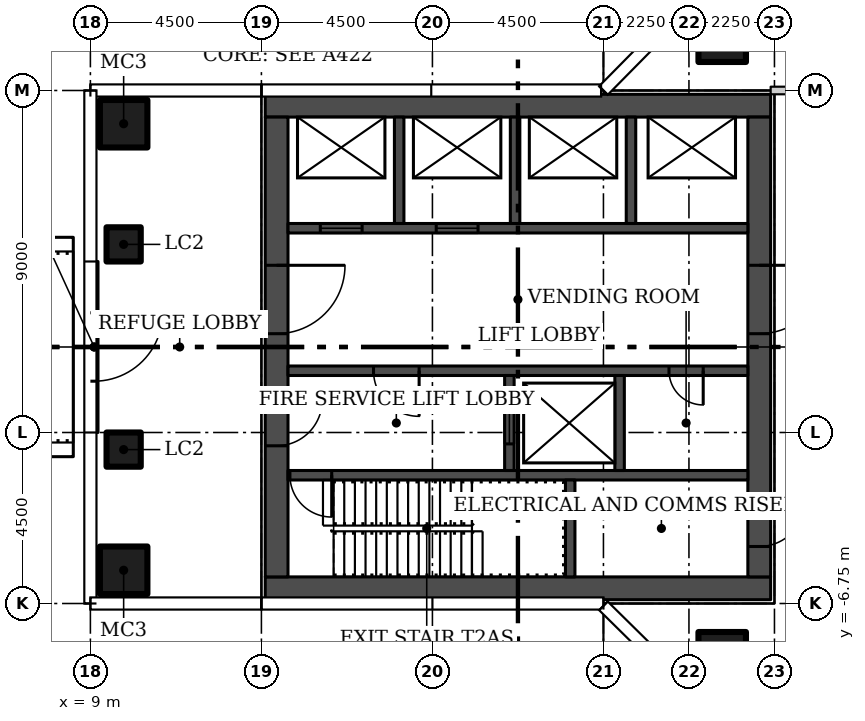
"""IFC4 building model, lengths in metres.
Left out: names, types, materials, properties, quantities, classifications, styles, units other than length and angle.
Written with IfcOpenShell. Run it as: python <this file> out.ifc"""

import sys

from ifc_helpers import new_model, si_unit, direction, frame, frame_2d, origin, origin_2d, place, context, subcontext, project, spatial, rectangle, hollow_rectangle, extrude, element, fill, save


model = new_model("IFC4")
c1 = context("Model", 3, precision=1e-05, world=origin(), true_north=direction((0.0, 1.0)))
c2 = subcontext(c1, "Body", "Model", "MODEL_VIEW")
j1 = project(units=[si_unit("LENGTHUNIT", "METRE"), si_unit("PLANEANGLEUNIT", "RADIAN")], contexts=[c1])
p1 = place(None, origin())
s1 = spatial("IfcSite", under=j1, at=p1, CompositionType="ELEMENT")
p2 = place(p1, origin())
s2 = spatial("IfcBuilding", under=s1, at=p2, CompositionType="ELEMENT")
p3 = place(p2, frame((0.0, 0.0, 128.7)))
s3 = spatial("IfcBuildingStorey", under=s2, at=p3, CompositionType="ELEMENT", Elevation=128.7)
for number, where in (
    (1, (25.625, 8.125, 0.0)),
    (2, (25.625, -8.125, 0.0)),
    (3, (9.875, -5.875, 0.0)),
    (4, (9.875, 5.875, 0.0)),
):
    element("IfcColumn", number, at=place(p3, frame(where)), inside=s3, PredefinedType="COLUMN", context=c2, shape_type="SweptSolid", body=[
        extrude(hollow_rectangle(XDim=1.25, YDim=1.25, WallThickness=0.05, at=origin_2d()), origin(), (0.0, 0.0, 1.0), 4.4),
    ])
for number, where in (
    (5, (9.875, -2.7, 0.0)),
    (6, (9.875, 2.7, 0.0)),
):
    element("IfcColumn", number, at=place(p3, frame(where)), inside=s3, PredefinedType="COLUMN", context=c2, shape_type="SweptSolid", body=[
        extrude(hollow_rectangle(XDim=0.9, YDim=0.9, WallThickness=0.036, at=origin_2d()), origin(), (0.0, 0.0, 1.0), 4.4),
    ])
p4 = place(p3, frame((40.6, 6.75, 0.0), z_axis=(0.0, 0.0, 1.0), x_axis=(-1.0, 0.0, 0.0)))
e7 = element("IfcWall", 7, at=p4, inside=s3, PredefinedType="PARTITIONING", context=c2, shape_type="SweptSolid", body=[
    extrude(rectangle(XDim=13.7, YDim=0.2, at=frame_2d((6.85, 0.0))), origin(), (0.0, 0.0, 1.0), 4.4),
])
p5 = place(p4, frame((6.1, 0.0, 0.0)))
e8 = element("IfcOpeningElement", 8, at=p5, cuts=e7, PredefinedType="OPENING", context=c2, shape_type="SweptSolid", body=[
    extrude(rectangle(XDim=1.5, YDim=2.4, at=frame_2d((0.75, 1.2))), frame((0.0, 0.11, 0.0), z_axis=(0.0, -1.0, 0.0), x_axis=(1.0, 0.0, 0.0)), (0.0, 0.0, 1.0), 0.22),
])
p6 = place(p3, frame((9.1, 2.25, 0.0), z_axis=(0.0, 0.0, 1.0), x_axis=(0.0, -1.0, 0.0)))
e9 = element("IfcWall", 9, at=p6, inside=s3, PredefinedType="PARTITIONING", context=c2, shape_type="SweptSolid", body=[
    extrude(rectangle(XDim=4.5, YDim=0.2, at=frame_2d((2.25, 0.0))), origin(), (0.0, 0.0, 1.0), 4.4),
])
p7 = place(p6, frame((1.35, 0.0, 0.0)))
e10 = element("IfcOpeningElement", 10, at=p7, cuts=e9, PredefinedType="OPENING", context=c2, shape_type="SweptSolid", body=[
    extrude(rectangle(XDim=1.8, YDim=2.1, at=frame_2d((0.9, 1.05))), frame((0.0, 0.11, 0.0), z_axis=(0.0, -1.0, 0.0), x_axis=(1.0, 0.0, 0.0)), (0.0, 0.0, 1.0), 0.22),
])
for number, where in (
    (11, (13.6, -6.35, 0.0)),
    (12, (13.6, 6.35, 0.0)),
):
    element("IfcWall", number, at=place(p3, frame(where)), inside=s3, PredefinedType="SHEAR", context=c2, shape_type="SweptSolid", body=[
        extrude(rectangle(XDim=13.3, YDim=0.6, at=frame_2d((6.65, 0.0))), origin(), (0.0, 0.0, 1.0), 4.4),
    ])
p8 = place(p3, frame((13.9, 6.05, 0.0), z_axis=(0.0, 0.0, 1.0), x_axis=(0.0, -1.0, 0.0)))
e13 = element("IfcWall", 13, at=p8, inside=s3, PredefinedType="SHEAR", context=c2, shape_type="SweptSolid", body=[
    extrude(rectangle(XDim=12.1, YDim=0.6, at=frame_2d((6.05, 0.0))), origin(), (0.0, 0.0, 1.0), 4.4),
])
p9 = place(p8, frame((7.45, 0.0, 0.0)))
e14 = element("IfcOpeningElement", 14, at=p9, cuts=e13, PredefinedType="OPENING", context=c2, shape_type="SweptSolid", body=[
    extrude(rectangle(XDim=1.2, YDim=2.1, at=frame_2d((0.6, 1.05))), frame((0.0, 0.31, 0.0), z_axis=(0.0, -1.0, 0.0), x_axis=(1.0, 0.0, 0.0)), (0.0, 0.0, 1.0), 0.62),
])
p10 = place(p8, frame((3.9, 0.0, 0.0)))
e15 = element("IfcOpeningElement", 15, at=p10, cuts=e13, PredefinedType="OPENING", context=c2, shape_type="SweptSolid", body=[
    extrude(rectangle(XDim=1.8, YDim=2.4, at=frame_2d((0.9, 1.2))), frame((0.0, 0.31, 0.0), z_axis=(0.0, -1.0, 0.0), x_axis=(1.0, 0.0, 0.0)), (0.0, 0.0, 1.0), 0.62),
])
p11 = place(p3, frame((26.6, 6.05, 0.0), z_axis=(0.0, 0.0, 1.0), x_axis=(0.0, -1.0, 0.0)))
e16 = element("IfcWall", 16, at=p11, inside=s3, PredefinedType="SHEAR", context=c2, shape_type="SweptSolid", body=[
    extrude(rectangle(XDim=12.1, YDim=0.6, at=frame_2d((6.05, 0.0))), origin(), (0.0, 0.0, 1.0), 4.4),
])
p12 = place(p11, frame((10.1, 0.0, 0.0)))
e17 = element("IfcOpeningElement", 17, at=p12, cuts=e16, PredefinedType="OPENING", context=c2, shape_type="SweptSolid", body=[
    extrude(rectangle(XDim=1.2, YDim=2.1, at=frame_2d((0.6, 1.05))), frame((0.0, 0.31, 0.0), z_axis=(0.0, -1.0, 0.0), x_axis=(1.0, 0.0, 0.0)), (0.0, 0.0, 1.0), 0.62),
])
p13 = place(p11, frame((3.9, 0.0, 0.0)))
e18 = element("IfcOpeningElement", 18, at=p13, cuts=e16, PredefinedType="OPENING", context=c2, shape_type="SweptSolid", body=[
    extrude(rectangle(XDim=1.8, YDim=2.4, at=frame_2d((0.9, 1.2))), frame((0.0, 0.31, 0.0), z_axis=(0.0, -1.0, 0.0), x_axis=(1.0, 0.0, 0.0)), (0.0, 0.0, 1.0), 0.62),
])
p14 = place(p3, frame((26.3, -3.375, 0.0), z_axis=(0.0, 0.0, 1.0), x_axis=(-1.0, 0.0, 0.0)))
e19 = element("IfcWall", 19, at=p14, inside=s3, PredefinedType="SHEAR", context=c2, shape_type="SweptSolid", body=[
    extrude(rectangle(XDim=12.1, YDim=0.25, at=frame_2d((6.05, 0.0))), origin(), (0.0, 0.0, 1.0), 4.4),
])
p15 = place(p14, frame((10.95, 0.0, 0.0)))
e20 = element("IfcOpeningElement", 20, at=p15, cuts=e19, PredefinedType="OPENING", context=c2, shape_type="SweptSolid", body=[
    extrude(rectangle(XDim=1.1, YDim=2.1, at=frame_2d((0.55, 1.05))), frame((0.0, 0.135, 0.0), z_axis=(0.0, -1.0, 0.0), x_axis=(1.0, 0.0, 0.0)), (0.0, 0.0, 1.0), 0.27),
])
p16 = place(p3, frame((21.625, -6.05, 0.0), z_axis=(0.0, 0.0, 1.0), x_axis=(0.0, 1.0, 0.0)))
e21 = element("IfcWall", 21, at=p16, inside=s3, PredefinedType="SHEAR", context=c2, shape_type="SweptSolid", body=[
    extrude(rectangle(XDim=2.55, YDim=0.25, at=frame_2d((1.275, 0.0))), origin(), (0.0, 0.0, 1.0), 4.4),
])
p17 = place(p3, frame((26.3, -0.625, 0.0), z_axis=(0.0, 0.0, 1.0), x_axis=(-1.0, 0.0, 0.0)))
e22 = element("IfcWall", 22, at=p17, inside=s3, PredefinedType="SHEAR", context=c2, shape_type="SweptSolid", body=[
    extrude(rectangle(XDim=12.1, YDim=0.25, at=frame_2d((6.05, 0.0))), origin(), (0.0, 0.0, 1.0), 4.4),
])
p18 = place(p17, frame((8.65, 0.0, 0.0)))
e23 = element("IfcOpeningElement", 23, at=p18, cuts=e22, PredefinedType="OPENING", context=c2, shape_type="SweptSolid", body=[
    extrude(rectangle(XDim=1.2, YDim=2.1, at=frame_2d((0.6, 1.05))), frame((0.0, 0.135, 0.0), z_axis=(0.0, -1.0, 0.0), x_axis=(1.0, 0.0, 0.0)), (0.0, 0.0, 1.0), 0.27),
])
p19 = place(p17, frame((1.175, 0.0, 0.0)))
e24 = element("IfcOpeningElement", 24, at=p19, cuts=e22, PredefinedType="OPENING", context=c2, shape_type="SweptSolid", body=[
    extrude(rectangle(XDim=0.9, YDim=2.1, at=frame_2d((0.45, 1.05))), frame((0.0, 0.135, 0.0), z_axis=(0.0, -1.0, 0.0), x_axis=(1.0, 0.0, 0.0)), (0.0, 0.0, 1.0), 0.27),
])
p20 = place(p3, frame((20.025, -3.25, 0.0), z_axis=(0.0, 0.0, 1.0), x_axis=(0.0, 1.0, 0.0)))
e25 = element("IfcWall", 25, at=p20, inside=s3, PredefinedType="SHEAR", context=c2, shape_type="SweptSolid", body=[
    extrude(rectangle(XDim=2.5, YDim=0.25, at=frame_2d((1.25, 0.0))), origin(), (0.0, 0.0, 1.0), 4.4),
])
p21 = place(p20, frame((0.7, 0.0, 0.0)))
e26 = element("IfcOpeningElement", 26, at=p21, cuts=e25, PredefinedType="OPENING", context=c2, shape_type="SweptSolid", body=[
    extrude(rectangle(XDim=1.1, YDim=2.1, at=frame_2d((0.55, 1.05))), frame((0.0, 0.135, 0.0), z_axis=(0.0, -1.0, 0.0), x_axis=(1.0, 0.0, 0.0)), (0.0, 0.0, 1.0), 0.27),
])
p22 = place(p3, frame((22.925, -3.25, 0.0), z_axis=(0.0, 0.0, 1.0), x_axis=(0.0, 1.0, 0.0)))
e27 = element("IfcWall", 27, at=p22, inside=s3, PredefinedType="SHEAR", context=c2, shape_type="SweptSolid", body=[
    extrude(rectangle(XDim=2.5, YDim=0.25, at=frame_2d((1.25, 0.0))), origin(), (0.0, 0.0, 1.0), 4.4),
])
p23 = place(p3, frame((14.2, 3.125, 0.0)))
e28 = element("IfcWall", 28, at=p23, inside=s3, PredefinedType="SHEAR", context=c2, shape_type="SweptSolid", body=[
    extrude(rectangle(XDim=12.1, YDim=0.25, at=frame_2d((6.05, 0.0))), origin(), (0.0, 0.0, 1.0), 4.4),
])
p24 = place(p23, frame((0.85, 0.0, 0.0)))
e29 = element("IfcOpeningElement", 29, at=p24, cuts=e28, PredefinedType="OPENING", context=c2, shape_type="SweptSolid", body=[
    extrude(rectangle(XDim=1.1, YDim=2.1, at=frame_2d((0.55, 1.05))), frame((0.0, 0.135, 0.0), z_axis=(0.0, -1.0, 0.0), x_axis=(1.0, 0.0, 0.0)), (0.0, 0.0, 1.0), 0.27),
])
p25 = place(p23, frame((3.9, 0.0, 0.0)))
e30 = element("IfcOpeningElement", 30, at=p25, cuts=e28, PredefinedType="OPENING", context=c2, shape_type="SweptSolid", body=[
    extrude(rectangle(XDim=1.1, YDim=2.1, at=frame_2d((0.55, 1.05))), frame((0.0, 0.135, 0.0), z_axis=(0.0, -1.0, 0.0), x_axis=(1.0, 0.0, 0.0)), (0.0, 0.0, 1.0), 0.27),
])
for number, where, z_axis, x_axis in (
    (31, (17.125, 3.25, 0.0), (0.0, 0.0, 1.0), (0.0, 1.0, 0.0)),
    (32, (20.175, 3.25, 0.0), (0.0, 0.0, 1.0), (0.0, 1.0, 0.0)),
    (33, (23.225, 3.25, 0.0), (0.0, 0.0, 1.0), (0.0, 1.0, 0.0)),
):
    element("IfcWall", number, at=place(p3, frame(where, z_axis=z_axis, x_axis=x_axis)), inside=s3, PredefinedType="SHEAR", context=c2, shape_type="SweptSolid", body=[
        extrude(rectangle(XDim=2.8, YDim=0.25, at=frame_2d((1.4, 0.0))), origin(), (0.0, 0.0, 1.0), 4.4),
    ])
p26 = place(p7, origin())
e34 = element("IfcDoor", 34, at=p26, inside=s3, OperationType="DOUBLE_DOOR_SINGLE_SWING", PredefinedType="DOOR", context=c2, shape_type="SweptSolid", body=[
    extrude(rectangle(XDim=1.8, YDim=2.1, at=frame_2d((0.9, 1.05))), frame((0.0, 0.025, 0.0), z_axis=(0.0, -1.0, 0.0), x_axis=(1.0, 0.0, 0.0)), (0.0, 0.0, 1.0), 0.05),
])
fill(e10, e34)
p27 = place(p9, origin())
e35 = element("IfcDoor", 35, at=p27, inside=s3, OperationType="SINGLE_SWING_RIGHT", PredefinedType="DOOR", context=c2, shape_type="SweptSolid", body=[
    extrude(rectangle(XDim=1.2, YDim=2.1, at=frame_2d((0.6, 1.05))), frame((0.0, 0.025, 0.0), z_axis=(0.0, -1.0, 0.0), x_axis=(1.0, 0.0, 0.0)), (0.0, 0.0, 1.0), 0.05),
])
fill(e14, e35)
p28 = place(p10, origin())
e36 = element("IfcDoor", 36, at=p28, inside=s3, OperationType="DOUBLE_DOOR_SINGLE_SWING", PredefinedType="DOOR", context=c2, shape_type="SweptSolid", body=[
    extrude(rectangle(XDim=1.8, YDim=2.4, at=frame_2d((0.9, 1.2))), frame((0.0, 0.025, 0.0), z_axis=(0.0, -1.0, 0.0), x_axis=(1.0, 0.0, 0.0)), (0.0, 0.0, 1.0), 0.05),
])
fill(e15, e36)
p29 = place(p12, origin())
e37 = element("IfcDoor", 37, at=p29, inside=s3, OperationType="SINGLE_SWING_RIGHT", PredefinedType="DOOR", context=c2, shape_type="SweptSolid", body=[
    extrude(rectangle(XDim=1.2, YDim=2.1, at=frame_2d((0.6, 1.05))), frame((0.0, 0.025, 0.0), z_axis=(0.0, -1.0, 0.0), x_axis=(1.0, 0.0, 0.0)), (0.0, 0.0, 1.0), 0.05),
])
fill(e17, e37)
p30 = place(p13, origin())
e38 = element("IfcDoor", 38, at=p30, inside=s3, OperationType="DOUBLE_DOOR_SINGLE_SWING", PredefinedType="DOOR", context=c2, shape_type="SweptSolid", body=[
    extrude(rectangle(XDim=1.8, YDim=2.4, at=frame_2d((0.9, 1.2))), frame((0.0, 0.025, 0.0), z_axis=(0.0, -1.0, 0.0), x_axis=(1.0, 0.0, 0.0)), (0.0, 0.0, 1.0), 0.05),
])
fill(e18, e38)
p31 = place(p15, origin())
e39 = element("IfcDoor", 39, at=p31, inside=s3, OperationType="SINGLE_SWING_RIGHT", PredefinedType="DOOR", context=c2, shape_type="SweptSolid", body=[
    extrude(rectangle(XDim=1.1, YDim=2.1, at=frame_2d((0.55, 1.05))), frame((0.0, 0.025, 0.0), z_axis=(0.0, -1.0, 0.0), x_axis=(1.0, 0.0, 0.0)), (0.0, 0.0, 1.0), 0.05),
])
fill(e20, e39)
p32 = place(p18, origin())
e40 = element("IfcDoor", 40, at=p32, inside=s3, OperationType="SINGLE_SWING_RIGHT", PredefinedType="DOOR", context=c2, shape_type="SweptSolid", body=[
    extrude(rectangle(XDim=1.2, YDim=2.1, at=frame_2d((0.6, 1.05))), frame((0.0, 0.025, 0.0), z_axis=(0.0, -1.0, 0.0), x_axis=(1.0, 0.0, 0.0)), (0.0, 0.0, 1.0), 0.05),
])
fill(e23, e40)
p33 = place(p19, origin())
e41 = element("IfcDoor", 41, at=p33, inside=s3, OperationType="SINGLE_SWING_LEFT", PredefinedType="DOOR", context=c2, shape_type="SweptSolid", body=[
    extrude(rectangle(XDim=0.9, YDim=2.1, at=frame_2d((0.45, 1.05))), frame((0.0, 0.025, 0.0), z_axis=(0.0, -1.0, 0.0), x_axis=(1.0, 0.0, 0.0)), (0.0, 0.0, 1.0), 0.05),
])
fill(e24, e41)
p34 = place(p21, origin())
e42 = element("IfcDoor", 42, at=p34, inside=s3, OperationType="SLIDING_TO_LEFT", PredefinedType="DOOR", context=c2, shape_type="SweptSolid", body=[
    extrude(rectangle(XDim=1.1, YDim=2.1, at=frame_2d((0.55, 1.05))), frame((0.0, 0.025, 0.0), z_axis=(0.0, -1.0, 0.0), x_axis=(1.0, 0.0, 0.0)), (0.0, 0.0, 1.0), 0.05),
])
fill(e26, e42)
p35 = place(p24, origin())
e43 = element("IfcDoor", 43, at=p35, inside=s3, OperationType="SLIDING_TO_LEFT", PredefinedType="DOOR", context=c2, shape_type="SweptSolid", body=[
    extrude(rectangle(XDim=1.1, YDim=2.1, at=frame_2d((0.55, 1.05))), frame((0.0, 0.025, 0.0), z_axis=(0.0, -1.0, 0.0), x_axis=(1.0, 0.0, 0.0)), (0.0, 0.0, 1.0), 0.05),
])
fill(e29, e43)
p36 = place(p25, origin())
e44 = element("IfcDoor", 44, at=p36, inside=s3, OperationType="SLIDING_TO_LEFT", PredefinedType="DOOR", context=c2, shape_type="SweptSolid", body=[
    extrude(rectangle(XDim=1.1, YDim=2.1, at=frame_2d((0.55, 1.05))), frame((0.0, 0.025, 0.0), z_axis=(0.0, -1.0, 0.0), x_axis=(1.0, 0.0, 0.0)), (0.0, 0.0, 1.0), 0.05),
])
fill(e30, e44)
save(model, sys.argv[1])
